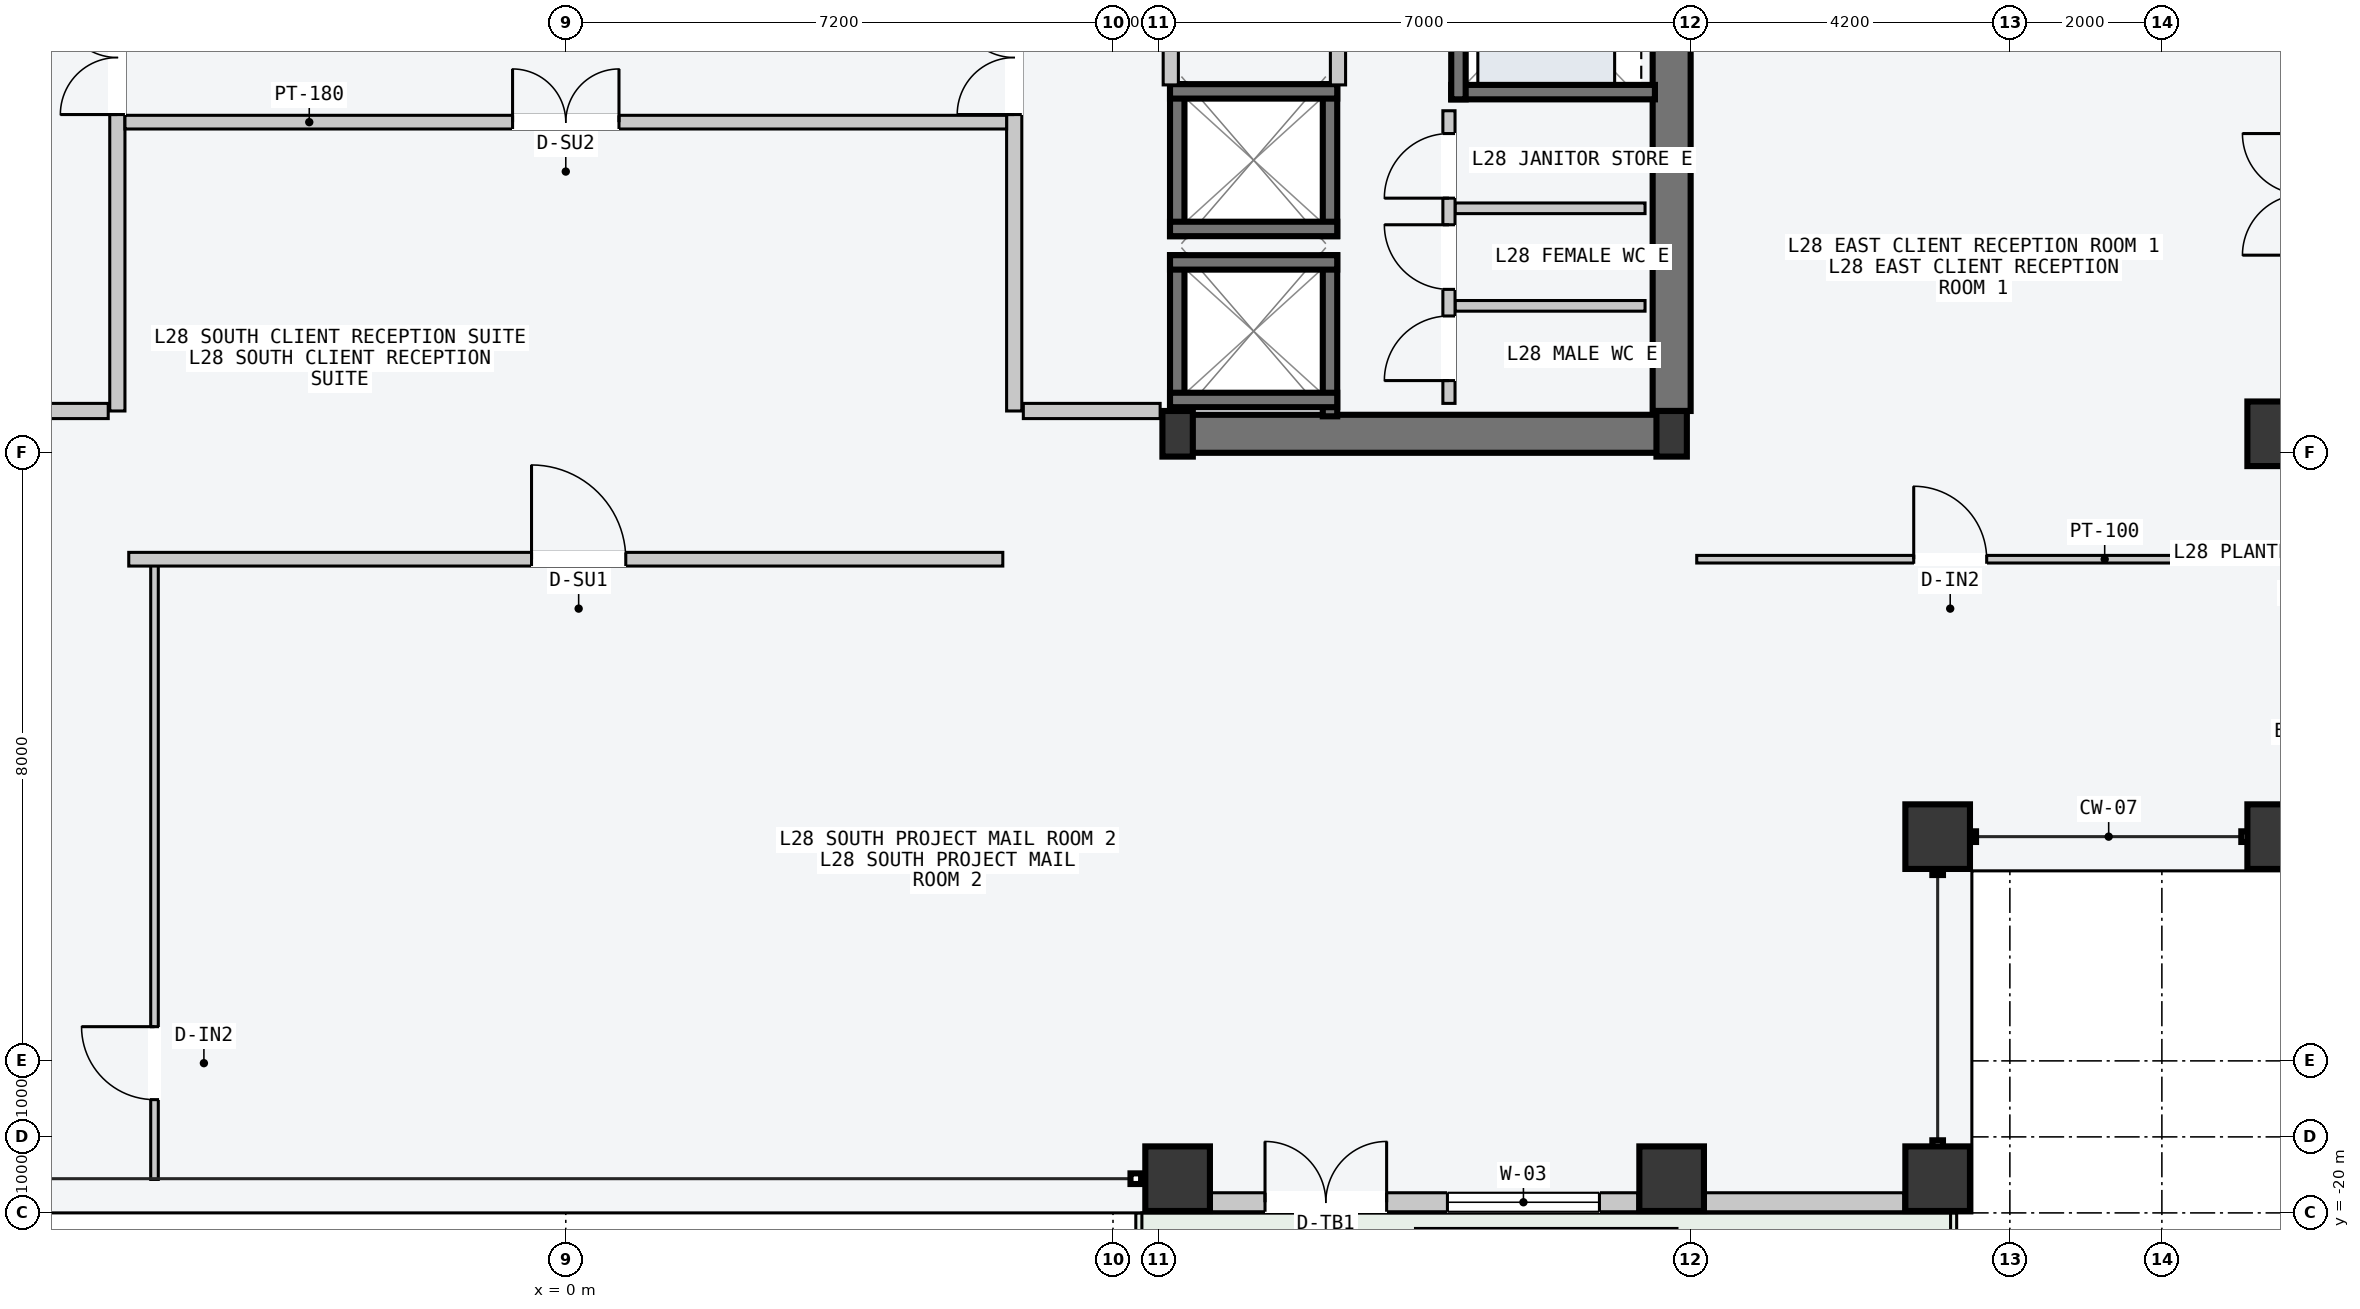
"""IFC4 building model, lengths in metres.
Left out: names, types, materials, properties, quantities, classifications, styles, units other than length and angle.
Written with IfcOpenShell. Run it as: python <this file> out.ifc"""

import sys

from ifc_helpers import new_model, si_unit, direction, frame, frame_2d, origin, origin_2d, place, context, subcontext, project, spatial, rectangle, hollow_rectangle, i_section, extrude, element, fill, save


model = new_model("IFC4")
c1 = context("Model", 3, precision=1e-05, world=origin(), true_north=direction((0.0, 1.0)))
c2 = subcontext(c1, "Body", "Model", "MODEL_VIEW")
j1 = project(units=[si_unit("LENGTHUNIT", "METRE"), si_unit("PLANEANGLEUNIT", "RADIAN")], contexts=[c1])
p1 = place(None, origin())
s1 = spatial("IfcSite", under=j1, at=p1, CompositionType="ELEMENT")
p2 = place(p1, origin())
s2 = spatial("IfcBuilding", under=s1, at=p2, CompositionType="ELEMENT")
p3 = place(p2, frame((0.0, 0.0, 109.8)))
s3 = spatial("IfcBuildingStorey", under=s2, at=p3, CompositionType="ELEMENT", Elevation=109.8)
p4 = place(p3, frame((8.07, -9.75, -0.2), z_axis=(0.0, 0.0, 1.0), x_axis=(1.0, 0.0, 0.0)))
e1 = element("IfcWall", 1, at=p4, inside=s3, PredefinedType="SHEAR", context=c2, shape_type="SweptSolid", body=[
    extrude(rectangle(XDim=6.46, YDim=0.5, at=frame_2d((3.23, 0.0))), origin(), (0.0, 0.0, 1.0), 3.6),
])
p5 = place(p3, frame((14.55, -9.45, -0.2), z_axis=(0.0, 0.0, 1.0), x_axis=(0.0, 1.0, 0.0)))
e2 = element("IfcWall", 2, at=p5, inside=s3, PredefinedType="SHEAR", context=c2, shape_type="SweptSolid", body=[
    extrude(rectangle(XDim=9.15, YDim=0.5, at=frame_2d((4.575, 0.0))), origin(), (0.0, 0.0, 1.0), 3.6),
])
for number, where, z_axis, x_axis in (
    (3, (8.05, -9.75, 0.0), (0.0, 0.0, 1.0), (1.0, 0.0, 0.0)),
    (4, (14.55, -9.75, 0.0), (0.0, 0.0, 1.0), (1.0, 0.0, 0.0)),
):
    element("IfcColumn", number, at=place(p3, frame(where, z_axis=z_axis, x_axis=x_axis)), inside=s3, PredefinedType="COLUMN", context=c2, shape_type="SweptSolid", body=[
        extrude(i_section(OverallWidth=0.4, OverallDepth=0.6, WebThickness=0.022, FlangeThickness=0.036, at=origin_2d()), origin(), (0.0, 0.0, 1.0), 3.6),
    ])
for number, where, z_axis, x_axis in (
    (5, (8.05, -19.55, 0.0), (0.0, 0.0, 1.0), (1.0, 0.0, 0.0)),
    (6, (14.55, -19.55, 0.0), (0.0, 0.0, 1.0), (1.0, 0.0, 0.0)),
    (7, (18.05, -19.55, 0.0), (0.0, 0.0, 1.0), (1.0, 0.0, 0.0)),
    (8, (22.55, -15.05, 0.0), (0.0, 0.0, 1.0), (0.0, 1.0, 0.0)),
    (9, (22.55, -9.75, 0.0), (0.0, 0.0, 1.0), (0.0, 1.0, 0.0)),
    (10, (18.05, -15.05, 0.0), (0.0, 0.0, 1.0), (1.0, 0.0, 0.0)),
):
    element("IfcColumn", number, at=place(p3, frame(where, z_axis=z_axis, x_axis=x_axis)), inside=s3, PredefinedType="COLUMN", context=c2, shape_type="SweptSolid", body=[
        extrude(hollow_rectangle(XDim=0.85, YDim=0.85, WallThickness=0.04, at=origin_2d()), origin(), (0.0, 0.0, 1.0), 3.6),
    ])
p6 = place(p3, frame((8.495, -19.86, 0.0), z_axis=(0.0, 0.0, 1.0), x_axis=(1.0, 0.0, 0.0)))
e11 = element("IfcWall", 11, at=p6, inside=s3, PredefinedType="STANDARD", context=c2, shape_type="SweptSolid", body=[
    extrude(rectangle(XDim=5.61, YDim=0.25, at=frame_2d((2.805, 0.0))), origin(), (0.0, 0.0, 1.0), 3.4),
])
p7 = place(p6, frame((0.705, 0.0, 0.0)))
e12 = element("IfcOpeningElement", 12, at=p7, cuts=e11, PredefinedType="OPENING", context=c2, shape_type="SweptSolid", body=[
    extrude(rectangle(XDim=1.6, YDim=2.2, at=frame_2d((0.8, 1.1))), frame((0.0, 0.135, 0.0), z_axis=(0.0, -1.0, 0.0), x_axis=(1.0, 0.0, 0.0)), (0.0, 0.0, 1.0), 0.27),
])
p8 = place(p6, frame((3.105, 0.0, 0.85)))
e13 = element("IfcOpeningElement", 13, at=p8, cuts=e11, PredefinedType="OPENING", context=c2, shape_type="SweptSolid", body=[
    extrude(rectangle(XDim=2.0, YDim=2.1, at=frame_2d((1.0, 1.05))), frame((0.0, 0.135, 0.0), z_axis=(0.0, -1.0, 0.0), x_axis=(1.0, 0.0, 0.0)), (0.0, 0.0, 1.0), 0.27),
])
p9 = place(p3, frame((14.995, -19.86, 0.0), z_axis=(0.0, 0.0, 1.0), x_axis=(1.0, 0.0, 0.0)))
e14 = element("IfcWall", 14, at=p9, inside=s3, PredefinedType="STANDARD", context=c2, shape_type="SweptSolid", body=[
    extrude(rectangle(XDim=2.61, YDim=0.25, at=frame_2d((1.305, 0.0))), origin(), (0.0, 0.0, 1.0), 3.4),
])
for number, where, z_axis, x_axis in (
    (15, (8.045, -9.52, -0.2), (0.0, 0.0, 1.0), (0.0, 1.0, 0.0)),
    (16, (10.055, -9.52, -0.2), (0.0, 0.0, 1.0), (0.0, 1.0, 0.0)),
):
    element("IfcWall", number, at=place(p3, frame(where, z_axis=z_axis, x_axis=x_axis)), inside=s3, PredefinedType="SOLIDWALL", context=c2, shape_type="SweptSolid", body=[
        extrude(rectangle(XDim=2.12, YDim=0.19, at=frame_2d((1.06, 0.0))), origin(), (0.0, 0.0, 1.0), 3.6),
    ])
for number, where, z_axis, x_axis in (
    (17, (7.95, -7.495, -0.2), (0.0, 0.0, 1.0), (1.0, 0.0, 0.0)),
    (18, (7.95, -9.305, -0.2), (0.0, 0.0, 1.0), (1.0, 0.0, 0.0)),
):
    element("IfcWall", number, at=place(p3, frame(where, z_axis=z_axis, x_axis=x_axis)), inside=s3, PredefinedType="SOLIDWALL", context=c2, shape_type="SweptSolid", body=[
        extrude(rectangle(XDim=2.2, YDim=0.19, at=frame_2d((1.1, 0.0))), origin(), (0.0, 0.0, 1.0), 3.6),
    ])
for number, where, z_axis, x_axis in (
    (19, (8.045, -7.15, -0.2), (0.0, 0.0, 1.0), (0.0, 1.0, 0.0)),
    (20, (10.055, -7.15, -0.2), (0.0, 0.0, 1.0), (0.0, 1.0, 0.0)),
):
    element("IfcWall", number, at=place(p3, frame(where, z_axis=z_axis, x_axis=x_axis)), inside=s3, PredefinedType="SOLIDWALL", context=c2, shape_type="SweptSolid", body=[
        extrude(rectangle(XDim=2.0, YDim=0.19, at=frame_2d((1.0, 0.0))), origin(), (0.0, 0.0, 1.0), 3.6),
    ])
for number, where, z_axis, x_axis in (
    (21, (7.95, -5.245, -0.2), (0.0, 0.0, 1.0), (1.0, 0.0, 0.0)),
    (22, (7.95, -7.055, -0.2), (0.0, 0.0, 1.0), (1.0, 0.0, 0.0)),
):
    element("IfcWall", number, at=place(p3, frame(where, z_axis=z_axis, x_axis=x_axis)), inside=s3, PredefinedType="SOLIDWALL", context=c2, shape_type="SweptSolid", body=[
        extrude(rectangle(XDim=2.2, YDim=0.19, at=frame_2d((1.1, 0.0))), origin(), (0.0, 0.0, 1.0), 3.6),
    ])
p10 = place(p3, frame((11.65, -5.255, -0.2), z_axis=(0.0, 0.0, 1.0), x_axis=(1.0, 0.0, 0.0)))
e23 = element("IfcWall", 23, at=p10, inside=s3, PredefinedType="SOLIDWALL", context=c2, shape_type="SweptSolid", body=[
    extrude(rectangle(XDim=2.68, YDim=0.19, at=frame_2d((1.34, 0.0))), origin(), (0.0, 0.0, 1.0), 3.6),
])
p11 = place(p3, frame((11.745, -5.35, -0.2), z_axis=(0.0, 0.0, 1.0), x_axis=(0.0, 1.0, 0.0)))
e24 = element("IfcWall", 24, at=p11, inside=s3, PredefinedType="SOLIDWALL", context=c2, shape_type="SweptSolid", body=[
    extrude(rectangle(XDim=2.6, YDim=0.19, at=frame_2d((1.3, 0.0))), origin(), (0.0, 0.0, 1.0), 3.6),
])
p12 = place(p3, frame((-5.9, -9.45, 0.0), z_axis=(0.0, 0.0, 1.0), x_axis=(0.0, 1.0, 0.0)))
e25 = element("IfcWall", 25, at=p12, inside=s3, PredefinedType="PARTITIONING", context=c2, shape_type="SweptSolid", body=[
    extrude(rectangle(XDim=10.5, YDim=0.2, at=frame_2d((5.25, 0.0))), origin(), (0.0, 0.0, 1.0), 3.4),
])
p13 = place(p12, frame((3.9, 0.0, 0.0)))
e26 = element("IfcOpeningElement", 26, at=p13, cuts=e25, PredefinedType="OPENING", context=c2, shape_type="SweptSolid", body=[
    extrude(rectangle(XDim=1.5, YDim=2.2, at=frame_2d((0.75, 1.1))), frame((0.0, 0.11, 0.0), z_axis=(0.0, -1.0, 0.0), x_axis=(1.0, 0.0, 0.0)), (0.0, 0.0, 1.0), 0.22),
])
p14 = place(p3, frame((-6.02, -9.45, 0.0), z_axis=(0.0, 0.0, 1.0), x_axis=(-1.0, 0.0, 0.0)))
e27 = element("IfcWall", 27, at=p14, inside=s3, PredefinedType="PARTITIONING", context=c2, shape_type="SweptSolid", body=[
    extrude(rectangle(XDim=1.8, YDim=0.2, at=frame_2d((0.9, 0.0))), origin(), (0.0, 0.0, 1.0), 3.4),
])
p15 = place(p3, frame((5.9, -9.45, 0.0), z_axis=(0.0, 0.0, 1.0), x_axis=(0.0, 1.0, 0.0)))
e28 = element("IfcWall", 28, at=p15, inside=s3, PredefinedType="PARTITIONING", context=c2, shape_type="SweptSolid", body=[
    extrude(rectangle(XDim=18.9, YDim=0.2, at=frame_2d((9.45, 0.0))), origin(), (0.0, 0.0, 1.0), 3.4),
])
p16 = place(p15, frame((3.9, 0.0, 0.0)))
e29 = element("IfcOpeningElement", 29, at=p16, cuts=e28, PredefinedType="OPENING", context=c2, shape_type="SweptSolid", body=[
    extrude(rectangle(XDim=1.5, YDim=2.2, at=frame_2d((0.75, 1.1))), frame((0.0, 0.11, 0.0), z_axis=(0.0, -1.0, 0.0), x_axis=(1.0, 0.0, 0.0)), (0.0, 0.0, 1.0), 0.22),
])
p17 = place(p3, frame((6.02, -9.45, 0.0), z_axis=(0.0, 0.0, 1.0), x_axis=(1.0, 0.0, 0.0)))
e30 = element("IfcWall", 30, at=p17, inside=s3, PredefinedType="PARTITIONING", context=c2, shape_type="SweptSolid", body=[
    extrude(rectangle(XDim=1.8, YDim=0.2, at=frame_2d((0.9, 0.0))), origin(), (0.0, 0.0, 1.0), 3.4),
])
for number, where, z_axis, x_axis in (
    (31, (7.96, -5.16, 0.0), (0.0, 0.0, 1.0), (0.0, 1.0, 0.0)),
    (32, (10.16, -5.16, 0.0), (0.0, 0.0, 1.0), (0.0, 1.0, 0.0)),
):
    element("IfcWall", number, at=place(p3, frame(where, z_axis=z_axis, x_axis=x_axis)), inside=s3, PredefinedType="PARTITIONING", context=c2, shape_type="SweptSolid", body=[
        extrude(rectangle(XDim=2.44, YDim=0.2, at=frame_2d((1.22, 0.0))), origin(), (0.0, 0.0, 1.0), 3.4),
    ])
for number, where, z_axis, x_axis in (
    (33, (11.7, -8.067, 0.0), (0.0, 0.0, 1.0), (1.0, 0.0, 0.0)),
    (34, (11.7, -6.783, 0.0), (0.0, 0.0, 1.0), (1.0, 0.0, 0.0)),
):
    element("IfcWall", number, at=place(p3, frame(where, z_axis=z_axis, x_axis=x_axis)), inside=s3, PredefinedType="PARTITIONING", context=c2, shape_type="SweptSolid", body=[
        extrude(rectangle(XDim=2.5, YDim=0.14, at=frame_2d((1.25, 0.0))), origin(), (0.0, 0.0, 1.0), 3.4),
    ])
p18 = place(p3, frame((11.62, -9.35, 0.0), z_axis=(0.0, 0.0, 1.0), x_axis=(0.0, 1.0, 0.0)))
e35 = element("IfcWall", 35, at=p18, inside=s3, PredefinedType="PARTITIONING", context=c2, shape_type="SweptSolid", body=[
    extrude(rectangle(XDim=3.85, YDim=0.16, at=frame_2d((1.925, 0.0))), origin(), (0.0, 0.0, 1.0), 3.4),
])
p19 = place(p18, frame((0.3, 0.0, 0.0)))
e36 = element("IfcOpeningElement", 36, at=p19, cuts=e35, PredefinedType="OPENING", context=c2, shape_type="SweptSolid", body=[
    extrude(rectangle(XDim=0.85, YDim=2.12, at=frame_2d((0.425, 1.06))), frame((0.0, 0.09, 0.0), z_axis=(0.0, -1.0, 0.0), x_axis=(1.0, 0.0, 0.0)), (0.0, 0.0, 1.0), 0.18),
])
p20 = place(p18, frame((1.5, 0.0, 0.0)))
e37 = element("IfcOpeningElement", 37, at=p20, cuts=e35, PredefinedType="OPENING", context=c2, shape_type="SweptSolid", body=[
    extrude(rectangle(XDim=0.85, YDim=2.12, at=frame_2d((0.425, 1.06))), frame((0.0, 0.09, 0.0), z_axis=(0.0, -1.0, 0.0), x_axis=(1.0, 0.0, 0.0)), (0.0, 0.0, 1.0), 0.18),
])
p21 = place(p18, frame((2.7, 0.0, 0.0)))
e38 = element("IfcOpeningElement", 38, at=p21, cuts=e35, PredefinedType="OPENING", context=c2, shape_type="SweptSolid", body=[
    extrude(rectangle(XDim=0.85, YDim=2.12, at=frame_2d((0.425, 1.06))), frame((0.0, 0.09, 0.0), z_axis=(0.0, -1.0, 0.0), x_axis=(1.0, 0.0, 0.0)), (0.0, 0.0, 1.0), 0.18),
])
p22 = place(p3, frame((-5.8, -5.65, 0.0), z_axis=(0.0, 0.0, 1.0), x_axis=(1.0, 0.0, 0.0)))
e39 = element("IfcWall", 39, at=p22, inside=s3, PredefinedType="PARTITIONING", context=c2, shape_type="SweptSolid", body=[
    extrude(rectangle(XDim=11.6, YDim=0.18, at=frame_2d((5.8, 0.0))), origin(), (0.0, 0.0, 1.0), 3.4),
])
p23 = place(p22, frame((5.1, 0.0, 0.0)))
e40 = element("IfcOpeningElement", 40, at=p23, cuts=e39, PredefinedType="OPENING", context=c2, shape_type="SweptSolid", body=[
    extrude(rectangle(XDim=1.4, YDim=2.2, at=frame_2d((0.7, 1.1))), frame((0.0, 0.1, 0.0), z_axis=(0.0, -1.0, 0.0), x_axis=(1.0, 0.0, 0.0)), (0.0, 0.0, 1.0), 0.2),
])
p24 = place(p3, frame((-5.411, -19.56, 0.0), z_axis=(0.0, 0.0, 1.0), x_axis=(0.0, 1.0, 0.0)))
e41 = element("IfcWall", 41, at=p24, inside=s3, PredefinedType="PARTITIONING", context=c2, shape_type="SweptSolid", body=[
    extrude(rectangle(XDim=8.1, YDim=0.1, at=frame_2d((4.05, 0.0))), origin(), (0.0, 0.0, 1.0), 3.4),
])
p25 = place(p24, frame((1.05, 0.0, 0.0)))
e42 = element("IfcOpeningElement", 42, at=p25, cuts=e41, PredefinedType="OPENING", context=c2, shape_type="SweptSolid", body=[
    extrude(rectangle(XDim=0.96, YDim=2.18, at=frame_2d((0.48, 1.09))), frame((0.0, 0.06, 0.0), z_axis=(0.0, -1.0, 0.0), x_axis=(1.0, 0.0, 0.0)), (0.0, 0.0, 1.0), 0.12),
])
p26 = place(p3, frame((-5.75, -11.4, 0.0), z_axis=(0.0, 0.0, 1.0), x_axis=(1.0, 0.0, 0.0)))
e43 = element("IfcWall", 43, at=p26, inside=s3, PredefinedType="PARTITIONING", context=c2, shape_type="SweptSolid", body=[
    extrude(rectangle(XDim=11.5, YDim=0.18, at=frame_2d((5.75, 0.0))), origin(), (0.0, 0.0, 1.0), 3.4),
])
p27 = place(p26, frame((5.299, 0.0, 0.0)))
e44 = element("IfcOpeningElement", 44, at=p27, cuts=e43, PredefinedType="OPENING", context=c2, shape_type="SweptSolid", body=[
    extrude(rectangle(XDim=1.24, YDim=2.24, at=frame_2d((0.62, 1.12))), frame((0.0, 0.1, 0.0), z_axis=(0.0, -1.0, 0.0), x_axis=(1.0, 0.0, 0.0)), (0.0, 0.0, 1.0), 0.2),
])
p28 = place(p3, frame((14.88, -11.4, 0.0), z_axis=(0.0, 0.0, 1.0), x_axis=(1.0, 0.0, 0.0)))
e45 = element("IfcWall", 45, at=p28, inside=s3, PredefinedType="PARTITIONING", context=c2, shape_type="SweptSolid", body=[
    extrude(rectangle(XDim=6.67, YDim=0.1, at=frame_2d((3.335, 0.0))), origin(), (0.0, 0.0, 1.0), 3.4),
])
p29 = place(p28, frame((2.855, 0.0, 0.0)))
e46 = element("IfcOpeningElement", 46, at=p29, cuts=e45, PredefinedType="OPENING", context=c2, shape_type="SweptSolid", body=[
    extrude(rectangle(XDim=0.96, YDim=2.18, at=frame_2d((0.48, 1.09))), frame((0.0, 0.06, 0.0), z_axis=(0.0, -1.0, 0.0), x_axis=(1.0, 0.0, 0.0)), (0.0, 0.0, 1.0), 0.12),
])
p30 = place(p7, origin())
e47 = element("IfcDoor", 47, at=p30, inside=s3, OperationType="DOUBLE_DOOR_SINGLE_SWING", PredefinedType="DOOR", context=c2, shape_type="SweptSolid", body=[
    extrude(rectangle(XDim=1.6, YDim=2.2, at=frame_2d((0.8, 1.1))), frame((0.0, 0.025, 0.0), z_axis=(0.0, -1.0, 0.0), x_axis=(1.0, 0.0, 0.0)), (0.0, 0.0, 1.0), 0.05),
])
fill(e12, e47)
p31 = place(p8, origin())
e48 = element("IfcWindow", 48, at=p31, inside=s3, PartitioningType="SINGLE_PANEL", PredefinedType="WINDOW", context=c2, shape_type="SweptSolid", body=[
    extrude(rectangle(XDim=2.0, YDim=2.1, at=frame_2d((1.0, 1.05))), frame((0.0, 0.03, 0.0), z_axis=(0.0, -1.0, 0.0), x_axis=(1.0, 0.0, 0.0)), (0.0, 0.0, 1.0), 0.06),
])
fill(e13, e48)
p32 = place(p13, origin())
e49 = element("IfcDoor", 49, at=p32, inside=s3, OperationType="DOUBLE_DOOR_SINGLE_SWING", PredefinedType="DOOR", context=c2, shape_type="SweptSolid", body=[
    extrude(rectangle(XDim=1.5, YDim=2.2, at=frame_2d((0.75, 1.1))), frame((0.0, 0.025, 0.0), z_axis=(0.0, -1.0, 0.0), x_axis=(1.0, 0.0, 0.0)), (0.0, 0.0, 1.0), 0.05),
])
fill(e26, e49)
p33 = place(p16, origin())
e50 = element("IfcDoor", 50, at=p33, inside=s3, OperationType="DOUBLE_DOOR_SINGLE_SWING", PredefinedType="DOOR", context=c2, shape_type="SweptSolid", body=[
    extrude(rectangle(XDim=1.5, YDim=2.2, at=frame_2d((0.75, 1.1))), frame((0.0, 0.025, 0.0), z_axis=(0.0, -1.0, 0.0), x_axis=(1.0, 0.0, 0.0)), (0.0, 0.0, 1.0), 0.05),
])
fill(e29, e50)
p34 = place(p19, origin())
e51 = element("IfcDoor", 51, at=p34, inside=s3, OperationType="SINGLE_SWING_LEFT", PredefinedType="DOOR", context=c2, shape_type="SweptSolid", body=[
    extrude(rectangle(XDim=0.85, YDim=2.12, at=frame_2d((0.425, 1.06))), frame((0.0, 0.025, 0.0), z_axis=(0.0, -1.0, 0.0), x_axis=(1.0, 0.0, 0.0)), (0.0, 0.0, 1.0), 0.05),
])
fill(e36, e51)
p35 = place(p20, origin())
e52 = element("IfcDoor", 52, at=p35, inside=s3, OperationType="SINGLE_SWING_RIGHT", PredefinedType="DOOR", context=c2, shape_type="SweptSolid", body=[
    extrude(rectangle(XDim=0.85, YDim=2.12, at=frame_2d((0.425, 1.06))), frame((0.0, 0.025, 0.0), z_axis=(0.0, -1.0, 0.0), x_axis=(1.0, 0.0, 0.0)), (0.0, 0.0, 1.0), 0.05),
])
fill(e37, e52)
p36 = place(p21, origin())
e53 = element("IfcDoor", 53, at=p36, inside=s3, OperationType="SINGLE_SWING_LEFT", PredefinedType="DOOR", context=c2, shape_type="SweptSolid", body=[
    extrude(rectangle(XDim=0.85, YDim=2.12, at=frame_2d((0.425, 1.06))), frame((0.0, 0.025, 0.0), z_axis=(0.0, -1.0, 0.0), x_axis=(1.0, 0.0, 0.0)), (0.0, 0.0, 1.0), 0.05),
])
fill(e38, e53)
p37 = place(p23, origin())
e54 = element("IfcDoor", 54, at=p37, inside=s3, OperationType="DOUBLE_DOOR_SINGLE_SWING", PredefinedType="DOOR", context=c2, shape_type="SweptSolid", body=[
    extrude(rectangle(XDim=1.4, YDim=2.2, at=frame_2d((0.7, 1.1))), frame((0.0, 0.025, 0.0), z_axis=(0.0, -1.0, 0.0), x_axis=(1.0, 0.0, 0.0)), (0.0, 0.0, 1.0), 0.05),
])
fill(e40, e54)
p38 = place(p25, origin())
e55 = element("IfcDoor", 55, at=p38, inside=s3, OperationType="SINGLE_SWING_RIGHT", PredefinedType="DOOR", context=c2, shape_type="SweptSolid", body=[
    extrude(rectangle(XDim=0.96, YDim=2.18, at=frame_2d((0.48, 1.09))), frame((0.0, 0.025, 0.0), z_axis=(0.0, -1.0, 0.0), x_axis=(1.0, 0.0, 0.0)), (0.0, 0.0, 1.0), 0.05),
])
fill(e42, e55)
p39 = place(p27, origin())
e56 = element("IfcDoor", 56, at=p39, inside=s3, OperationType="SINGLE_SWING_LEFT", PredefinedType="DOOR", context=c2, shape_type="SweptSolid", body=[
    extrude(rectangle(XDim=1.24, YDim=2.24, at=frame_2d((0.62, 1.12))), frame((0.0, 0.025, 0.0), z_axis=(0.0, -1.0, 0.0), x_axis=(1.0, 0.0, 0.0)), (0.0, 0.0, 1.0), 0.05),
])
fill(e44, e56)
p40 = place(p29, origin())
e57 = element("IfcDoor", 57, at=p40, inside=s3, OperationType="SINGLE_SWING_LEFT", PredefinedType="DOOR", context=c2, shape_type="SweptSolid", body=[
    extrude(rectangle(XDim=0.96, YDim=2.18, at=frame_2d((0.48, 1.09))), frame((0.0, 0.025, 0.0), z_axis=(0.0, -1.0, 0.0), x_axis=(1.0, 0.0, 0.0)), (0.0, 0.0, 1.0), 0.05),
])
fill(e46, e57)
save(model, sys.argv[1])
